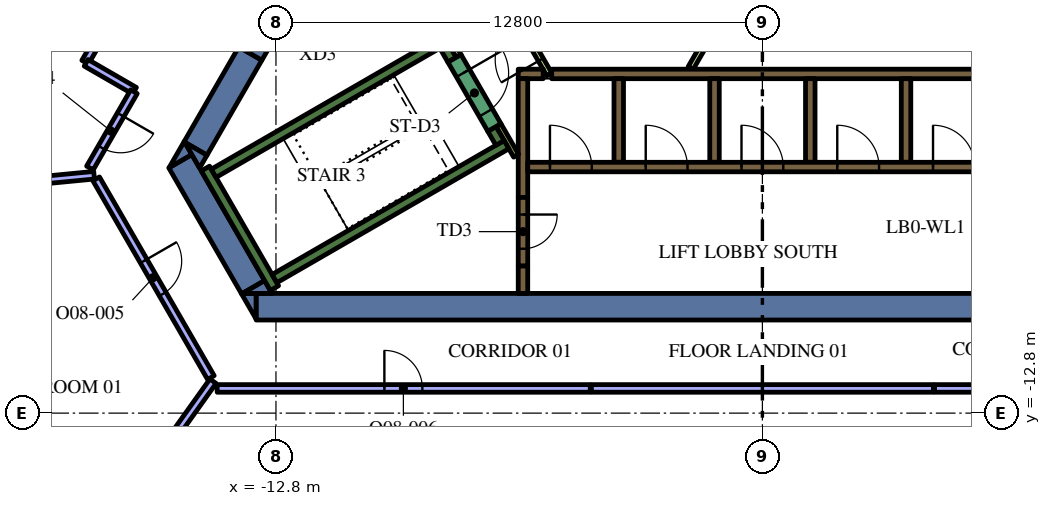
"""IFC4 building model, lengths in metres.
Left out: names, types, materials, properties, quantities, classifications, styles, units other than length and angle.
Written with IfcOpenShell. Run it as: python <this file> out.ifc"""

import sys

from ifc_helpers import new_model, si_unit, direction, frame, frame_2d, origin, place, context, subcontext, project, spatial, polyline, rectangle, outline, extrude, element, fill, save


model = new_model("IFC4")
c1 = context("Model", 3, precision=1e-05, world=origin(), true_north=direction((0.0, 1.0)))
c2 = subcontext(c1, "Body", "Model", "MODEL_VIEW")
j1 = project(units=[si_unit("LENGTHUNIT", "METRE"), si_unit("PLANEANGLEUNIT", "RADIAN")], contexts=[c1])
p1 = place(None, origin())
s1 = spatial("IfcSite", under=j1, at=p1, CompositionType="ELEMENT")
p2 = place(p1, origin())
s2 = spatial("IfcBuilding", under=s1, at=p2, CompositionType="ELEMENT")
p3 = place(p2, frame((0.0, 0.0, 231.0)))
s3 = spatial("IfcBuildingStorey", under=s2, at=p3, CompositionType="ELEMENT", Elevation=231.0)
p4 = place(p3, frame((8.904, -10.0, 0.0), z_axis=(0.0, 0.0, 1.0), x_axis=(-1.0, 0.0, 0.0)))
e1 = element("IfcWall", 1, at=p4, inside=s3, PredefinedType="SOLIDWALL", context=c2, shape_type="SweptSolid", body=[
    extrude(rectangle(XDim=22.226, YDim=0.7, at=frame_2d((11.113, 0.0))), origin(), (0.0, 0.0, 1.0), 4.2),
])
p5 = place(p3, origin())
e2 = element("IfcWall", 2, at=p5, inside=s3, PredefinedType="SOLIDWALL", context=c2, shape_type="SweptSolid", body=[
    extrude(outline(polyline([(-13.712, -9.65), (-13.324, -9.65), (-13.324, -10.322), (-13.712, -9.65)])), origin(), (0.0, 0.0, 1.0), 4.2),
])
p6 = place(p3, frame((-13.402, -9.487, 0.0), z_axis=(0.0, 0.0, 1.0), x_axis=(-0.500020498207, 0.866013568815, 0.0)))
e3 = element("IfcWall", 3, at=p6, inside=s3, PredefinedType="SOLIDWALL", context=c2, shape_type="SweptSolid", body=[
    extrude(rectangle(XDim=3.829, YDim=0.7, at=frame_2d((1.915, 0.0))), origin(), (0.0, 0.0, 1.0), 4.2),
])
e4 = element("IfcWall", 4, at=p5, inside=s3, PredefinedType="SOLIDWALL", context=c2, shape_type="SweptSolid", body=[
    extrude(outline(polyline([(-15.014, -5.995), (-15.611, -6.339), (-15.213, -5.65), (-15.014, -5.995)])), origin(), (0.0, 0.0, 1.0), 4.2),
])
e5 = element("IfcWall", 5, at=p5, inside=s3, PredefinedType="SOLIDWALL", context=c2, shape_type="SweptSolid", body=[
    extrude(outline(polyline([(-12.904, -9.65), (-13.68, -9.65), (-13.098, -9.314), (-12.904, -9.65)])), origin(), (0.0, 0.0, 1.0), 4.2),
])
p7 = place(p3, frame((-13.475, -3.339, 0.0), z_axis=(0.0, 0.0, 1.0), x_axis=(-0.499944726303, -0.866057313716, 0.0)))
e6 = element("IfcWall", 6, at=p7, inside=s3, PredefinedType="SOLIDWALL", context=c2, shape_type="SweptSolid", body=[
    extrude(rectangle(XDim=2.884, YDim=0.7, at=frame_2d((1.442, 0.0))), origin(), (0.0, 0.0, 1.0), 4.2),
])
e7 = element("IfcWall", 7, at=p5, inside=s3, PredefinedType="SOLIDWALL", context=c2, shape_type="SweptSolid", body=[
    extrude(outline(polyline([(-14.809, -6.35), (-15.197, -5.678), (-14.615, -6.014), (-14.809, -6.35)])), origin(), (0.0, 0.0, 1.0), 4.2),
])
p8 = place(p3, frame((-12.84, -9.511, 0.0), z_axis=(0.0, 0.0, 1.0), x_axis=(-0.499997733992, 0.866026712061, 0.0)))
e8 = element("IfcWall", 8, at=p8, inside=s3, PredefinedType="SOLIDWALL", context=c2, shape_type="SweptSolid", body=[
    extrude(rectangle(XDim=3.634, YDim=0.25, at=frame_2d((1.817, 0.0))), origin(), (0.0, 0.0, 1.0), 4.2),
])
p9 = place(p3, frame((-14.44, -6.49, 0.0), z_axis=(0.0, 0.0, 1.0), x_axis=(0.866022966069, 0.500004222222, 0.0)))
e9 = element("IfcWall", 9, at=p9, inside=s3, PredefinedType="SOLIDWALL", context=c2, shape_type="SweptSolid", body=[
    extrude(rectangle(XDim=6.8, YDim=0.25, at=frame_2d((3.4, 0.0))), origin(), (0.0, 0.0, 1.0), 4.2),
])
p10 = place(p3, frame((-8.168, -3.503, 0.0), z_axis=(0.0, 0.0, 1.0), x_axis=(-0.499952099219, 0.866053057547, 0.0)))
e10 = element("IfcWall", 10, at=p10, inside=s3, PredefinedType="SOLIDWALL", context=c2, shape_type="SweptSolid", body=[
    extrude(rectangle(XDim=0.675, YDim=0.25, at=frame_2d((0.337, 0.0))), origin(), (0.0, 0.0, 1.0), 4.2),
])
p11 = place(p3, frame((-12.84, -9.261, 0.0), z_axis=(0.0, 0.0, 1.0), x_axis=(0.866016039709, 0.500016218704, 0.0)))
e11 = element("IfcWall", 11, at=p11, inside=s3, PredefinedType="SOLIDWALL", context=c2, shape_type="SweptSolid", body=[
    extrude(rectangle(XDim=7.05, YDim=0.25, at=frame_2d((3.525, 0.0))), origin(), (0.0, 0.0, 1.0), 4.2),
])
p12 = place(p3, frame((-6.905, -5.69, 0.0), z_axis=(0.0, 0.0, 1.0), x_axis=(-0.500402024738, 0.865793170242, 0.0)))
e12 = element("IfcWall", 12, at=p12, inside=s3, PredefinedType="SOLIDWALL", context=c2, shape_type="SweptSolid", body=[
    extrude(rectangle(XDim=0.425, YDim=0.25, at=frame_2d((0.212, 0.0))), origin(), (0.0, 0.0, 1.0), 4.2),
])
p13 = place(p3, frame((-6.3, -8.925, 0.0), z_axis=(0.0, 0.0, 1.0), x_axis=(0.0, -1.0, 0.0)))
e13 = element("IfcWall", 13, at=p13, inside=s3, PredefinedType="SOLIDWALL", context=c2, shape_type="SweptSolid", body=[
    extrude(rectangle(XDim=0.725, YDim=0.25, at=frame_2d((0.363, 0.0))), origin(), (0.0, 0.0, 1.0), 4.2),
])
p14 = place(p3, frame((-5.545, -3.875, 0.0), z_axis=(0.0, 0.0, 1.0), x_axis=(1.0, 0.0, 0.0)))
e14 = element("IfcWall", 14, at=p14, inside=s3, PredefinedType="SOLIDWALL", context=c2, shape_type="SweptSolid", body=[
    extrude(rectangle(XDim=11.97, YDim=0.25, at=frame_2d((5.985, 0.0))), origin(), (0.0, 0.0, 1.0), 4.2),
])
p15 = place(p3, frame((-6.425, -3.875, 0.0), z_axis=(0.0, 0.0, 1.0), x_axis=(1.0, 0.0, 0.0)))
e15 = element("IfcWall", 15, at=p15, inside=s3, PredefinedType="SOLIDWALL", context=c2, shape_type="SweptSolid", body=[
    extrude(rectangle(XDim=0.658, YDim=0.25, at=frame_2d((0.329, 0.0))), origin(), (0.0, 0.0, 1.0), 4.2),
])
for number, where, z_axis, x_axis in (
    (16, (3.78, -4.0, 0.0), (0.0, 0.0, 1.0), (0.0, -1.0, 0.0)),
    (17, (1.26, -4.0, 0.0), (0.0, 0.0, 1.0), (0.0, -1.0, 0.0)),
    (18, (-1.26, -4.0, 0.0), (0.0, 0.0, 1.0), (0.0, -1.0, 0.0)),
    (19, (-3.78, -4.0, 0.0), (0.0, 0.0, 1.0), (0.0, -1.0, 0.0)),
):
    element("IfcWall", number, at=place(p3, frame(where, z_axis=z_axis, x_axis=x_axis)), inside=s3, PredefinedType="SOLIDWALL", context=c2, shape_type="SweptSolid", body=[
        extrude(rectangle(XDim=2.2, YDim=0.25, at=frame_2d((1.1, 0.0))), origin(), (0.0, 0.0, 1.0), 4.2),
    ])
p16 = place(p3, frame((-6.3, -7.125, 0.0), z_axis=(0.0, 0.0, 1.0), x_axis=(0.0, 1.0, 0.0)))
e20 = element("IfcWall", 20, at=p16, inside=s3, PredefinedType="SOLIDWALL", context=c2, shape_type="SweptSolid", body=[
    extrude(rectangle(XDim=3.125, YDim=0.25, at=frame_2d((1.562, 0.0))), origin(), (0.0, 0.0, 1.0), 4.2),
])
p17 = place(p3, frame((6.568, -3.627, 0.0), z_axis=(0.0, 0.0, 1.0), x_axis=(-0.499999455981, 0.866025717874, 0.0)))
e21 = element("IfcWall", 21, at=p17, inside=s3, PredefinedType="SOLIDWALL", context=c2, shape_type="SweptSolid", body=[
    extrude(rectangle(XDim=11.978, YDim=0.25, at=frame_2d((5.989, 0.0))), origin(), (0.0, 0.0, 1.0), 4.2),
])
p18 = place(p3, frame((-8.252, -2.958, 0.0), z_axis=(0.0, 0.0, 1.0), x_axis=(0.500174715838, -0.865924508047, 0.0)))
e22 = element("IfcWall", 22, at=p18, inside=s3, PredefinedType="PARTITIONING", context=c2, shape_type="SweptSolid", body=[
    extrude(rectangle(XDim=0.514, YDim=0.15, at=frame_2d((0.257, 0.0))), origin(), (0.0, 0.0, 1.0), 3.45),
])
p19 = place(p3, frame((-6.48, -6.027, 0.0), z_axis=(0.0, 0.0, 1.0), x_axis=(-0.499927229454, 0.866067413802, 0.0)))
e23 = element("IfcWall", 23, at=p19, inside=s3, PredefinedType="PARTITIONING", context=c2, shape_type="SweptSolid", body=[
    extrude(rectangle(XDim=0.929, YDim=0.15, at=frame_2d((0.464, 0.0))), origin(), (0.0, 0.0, 1.0), 4.2),
])
p20 = place(p3, frame((-1.887, -3.718, 0.0), z_axis=(0.0, 0.0, 1.0), x_axis=(0.500043732237, 0.866000153493, 0.0)))
e24 = element("IfcWall", 24, at=p20, inside=s3, PredefinedType="PARTITIONING", context=c2, shape_type="SweptSolid", body=[
    extrude(rectangle(XDim=3.114, YDim=0.15, at=frame_2d((1.557, 0.0))), origin(), (0.0, 0.0, 1.0), 3.45),
])
p21 = place(p3, frame((-6.175, -6.325, 0.0), z_axis=(0.0, 0.0, 1.0), x_axis=(1.0, 0.0, 0.0)))
e25 = element("IfcWall", 25, at=p21, inside=s3, PredefinedType="SOLIDWALL", context=c2, shape_type="SweptSolid", body=[
    extrude(rectangle(XDim=12.35, YDim=0.25, at=frame_2d((6.175, 0.0))), origin(), (0.0, 0.0, 1.0), 4.2),
])
p22 = place(p21, frame((0.585, 0.0, 0.0)))
e26 = element("IfcOpeningElement", 26, at=p22, cuts=e25, PredefinedType="OPENING", context=c2, shape_type="SweptSolid", body=[
    extrude(rectangle(XDim=1.1, YDim=2.1, at=frame_2d((0.55, 1.05))), frame((0.0, 0.135, 0.0), z_axis=(0.0, -1.0, 0.0), x_axis=(1.0, 0.0, 0.0)), (0.0, 0.0, 1.0), 0.27),
])
p23 = place(p21, frame((3.105, 0.0, 0.0)))
e27 = element("IfcOpeningElement", 27, at=p23, cuts=e25, PredefinedType="OPENING", context=c2, shape_type="SweptSolid", body=[
    extrude(rectangle(XDim=1.1, YDim=2.1, at=frame_2d((0.55, 1.05))), frame((0.0, 0.135, 0.0), z_axis=(0.0, -1.0, 0.0), x_axis=(1.0, 0.0, 0.0)), (0.0, 0.0, 1.0), 0.27),
])
p24 = place(p21, frame((5.625, 0.0, 0.0)))
e28 = element("IfcOpeningElement", 28, at=p24, cuts=e25, PredefinedType="OPENING", context=c2, shape_type="SweptSolid", body=[
    extrude(rectangle(XDim=1.1, YDim=2.1, at=frame_2d((0.55, 1.05))), frame((0.0, 0.135, 0.0), z_axis=(0.0, -1.0, 0.0), x_axis=(1.0, 0.0, 0.0)), (0.0, 0.0, 1.0), 0.27),
])
p25 = place(p21, frame((8.145, 0.0, 0.0)))
e29 = element("IfcOpeningElement", 29, at=p25, cuts=e25, PredefinedType="OPENING", context=c2, shape_type="SweptSolid", body=[
    extrude(rectangle(XDim=1.1, YDim=2.1, at=frame_2d((0.55, 1.05))), frame((0.0, 0.135, 0.0), z_axis=(0.0, -1.0, 0.0), x_axis=(1.0, 0.0, 0.0)), (0.0, 0.0, 1.0), 0.27),
])
p26 = place(p21, frame((10.665, 0.0, 0.0)))
e30 = element("IfcOpeningElement", 30, at=p26, cuts=e25, PredefinedType="OPENING", context=c2, shape_type="SweptSolid", body=[
    extrude(rectangle(XDim=1.1, YDim=2.1, at=frame_2d((0.55, 1.05))), frame((0.0, 0.135, 0.0), z_axis=(0.0, -1.0, 0.0), x_axis=(1.0, 0.0, 0.0)), (0.0, 0.0, 1.0), 0.27),
])
p27 = place(p3, frame((-8.103, -3.466, 0.0), z_axis=(0.0, 0.0, 1.0), x_axis=(0.500078061341, -0.865980330357, 0.0)))
e31 = element("IfcWall", 31, at=p27, inside=s3, PredefinedType="SOLIDWALL", context=c2, shape_type="SweptSolid", body=[
    extrude(rectangle(XDim=2.1, YDim=0.4, at=frame_2d((1.05, 0.0))), origin(), (0.0, 0.0, 1.0), 4.2),
])
p28 = place(p27, frame((0.45, 0.0, 0.0)))
e32 = element("IfcOpeningElement", 32, at=p28, cuts=e31, PredefinedType="OPENING", context=c2, shape_type="SweptSolid", body=[
    extrude(rectangle(XDim=1.2, YDim=2.1, at=frame_2d((0.6, 1.05))), frame((0.0, 0.21, 0.0), z_axis=(0.0, -1.0, 0.0), x_axis=(1.0, 0.0, 0.0)), (0.0, 0.0, 1.0), 0.42),
])
p29 = place(p3, frame((-6.3, -7.125, 0.0), z_axis=(0.0, 0.0, 1.0), x_axis=(0.0, -1.0, 0.0)))
e33 = element("IfcWall", 33, at=p29, inside=s3, PredefinedType="SOLIDWALL", context=c2, shape_type="SweptSolid", body=[
    extrude(rectangle(XDim=1.8, YDim=0.25, at=frame_2d((0.9, 0.0))), origin(), (0.0, 0.0, 1.0), 4.2),
])
p30 = place(p29, frame((0.45, 0.0, 0.0)))
e34 = element("IfcOpeningElement", 34, at=p30, cuts=e33, PredefinedType="OPENING", context=c2, shape_type="SweptSolid", body=[
    extrude(rectangle(XDim=0.9, YDim=2.1, at=frame_2d((0.45, 1.05))), frame((0.0, 0.135, 0.0), z_axis=(0.0, -1.0, 0.0), x_axis=(1.0, 0.0, 0.0)), (0.0, 0.0, 1.0), 0.27),
])
p31 = place(p3, frame((-5.606, -3.89, 0.0), z_axis=(0.0, 0.0, 1.0), x_axis=(-0.500027713859, 0.866009402589, 0.0)))
e35 = element("IfcWall", 35, at=p31, inside=s3, PredefinedType="PARTITIONING", context=c2, shape_type="SweptSolid", body=[
    extrude(rectangle(XDim=2.1, YDim=0.15, at=frame_2d((1.05, 0.0))), origin(), (0.0, 0.0, 1.0), 3.45),
])
p32 = place(p31, frame((0.45, 0.0, 0.0)))
e36 = element("IfcOpeningElement", 36, at=p32, cuts=e35, PredefinedType="OPENING", context=c2, shape_type="SweptSolid", body=[
    extrude(rectangle(XDim=1.2, YDim=2.1, at=frame_2d((0.6, 1.05))), frame((0.0, 0.085, 0.0), z_axis=(0.0, -1.0, 0.0), x_axis=(1.0, 0.0, 0.0)), (0.0, 0.0, 1.0), 0.17),
])
p33 = place(p3, frame((-13.475, -3.339, 0.0), z_axis=(0.0, 0.0, 1.0), x_axis=(0.499954529098, 0.86605165483, 0.0)))
e37 = element("IfcWall", 37, at=p33, inside=s3, PredefinedType="SOLIDWALL", context=c2, shape_type="SweptSolid", body=[
    extrude(rectangle(XDim=1.7, YDim=0.7, at=frame_2d((0.85, 0.0))), origin(), (0.0, 0.0, 1.0), 4.2),
])
p34 = place(p33, frame((0.25, 0.0, 0.0)))
e38 = element("IfcOpeningElement", 38, at=p34, cuts=e37, PredefinedType="OPENING", context=c2, shape_type="SweptSolid", body=[
    extrude(rectangle(XDim=1.2, YDim=2.1, at=frame_2d((0.6, 1.05))), frame((0.0, 0.36, 0.0), z_axis=(0.0, -1.0, 0.0), x_axis=(1.0, 0.0, 0.0)), (0.0, 0.0, 1.0), 0.72),
])
p35 = place(p3, frame((-17.586, -6.54, 0.0), z_axis=(0.0, 0.0, 1.0), x_axis=(-0.995357542522, -0.096246363795, 0.0)))
e39 = element("IfcWall", 39, at=p35, inside=s3, PredefinedType="PARTITIONING", context=c2, shape_type="SweptSolid", body=[
    extrude(rectangle(XDim=7.318, YDim=0.2, at=frame_2d((3.659, 0.0))), origin(), (0.0, 0.0, 1.0), 3.45),
])
p36 = place(p3, frame((-16.681, -1.593, 0.0), z_axis=(0.0, 0.0, 1.0), x_axis=(-0.499985038317, -0.866034041744, 0.0)))
e40 = element("IfcWall", 40, at=p36, inside=s3, PredefinedType="PARTITIONING", context=c2, shape_type="SweptSolid", body=[
    extrude(rectangle(XDim=2.28, YDim=0.2, at=frame_2d((1.14, 0.0))), origin(), (0.0, 0.0, 1.0), 3.45),
])
p37 = place(p3, frame((-17.795, -3.582, 0.0), z_axis=(0.0, 0.0, 1.0), x_axis=(0.866016893711, -0.50001473959, 0.0)))
e41 = element("IfcWall", 41, at=p37, inside=s3, PredefinedType="PARTITIONING", context=c2, shape_type="SweptSolid", body=[
    extrude(rectangle(XDim=1.47, YDim=0.2, at=frame_2d((0.735, 0.0))), origin(), (0.0, 0.0, 1.0), 3.45),
])
p38 = place(p3, frame((-16.537, -4.343, 0.0), z_axis=(0.0, 0.0, 1.0), x_axis=(-0.500014285048, -0.866017156151, 0.0)))
e42 = element("IfcWall", 42, at=p38, inside=s3, PredefinedType="PARTITIONING", context=c2, shape_type="SweptSolid", body=[
    extrude(rectangle(XDim=2.317, YDim=0.2, at=frame_2d((1.159, 0.0))), origin(), (0.0, 0.0, 1.0), 3.45),
])
p39 = place(p38, frame((0.7, 0.0, 0.0)))
e43 = element("IfcOpeningElement", 43, at=p39, cuts=e42, PredefinedType="OPENING", context=c2, shape_type="SweptSolid", body=[
    extrude(rectangle(XDim=1.0, YDim=2.1, at=frame_2d((0.5, 1.05))), frame((0.0, 0.11, 0.0), z_axis=(0.0, -1.0, 0.0), x_axis=(1.0, 0.0, 0.0)), (0.0, 0.0, 1.0), 0.22),
])
p40 = place(p3, frame((-14.457, -11.96, 0.0), z_axis=(0.0, 0.0, 1.0), x_axis=(-0.581023578026, -0.813886725397, 0.0)))
e44 = element("IfcWall", 44, at=p40, inside=s3, PredefinedType="PARTITIONING", context=c2, shape_type="SweptSolid", body=[
    extrude(rectangle(XDim=7.318, YDim=0.2, at=frame_2d((3.659, 0.0))), origin(), (0.0, 0.0, 1.0), 3.45),
])
p41 = place(p3, frame((-17.531, -6.635, 0.0), z_axis=(0.0, 0.0, 1.0), x_axis=(0.500009459589, -0.866019942219, 0.0)))
e45 = element("IfcWall", 45, at=p41, inside=s3, PredefinedType="PARTITIONING", context=c2, shape_type="SweptSolid", body=[
    extrude(rectangle(XDim=6.038, YDim=0.2, at=frame_2d((3.019, 0.0))), origin(), (0.0, 0.0, 1.0), 3.45),
])
p42 = place(p41, frame((2.5, 0.0, 0.0)))
e46 = element("IfcOpeningElement", 46, at=p42, cuts=e45, PredefinedType="OPENING", context=c2, shape_type="SweptSolid", body=[
    extrude(rectangle(XDim=1.0, YDim=2.1, at=frame_2d((0.5, 1.05))), frame((0.0, 0.11, 0.0), z_axis=(0.0, -1.0, 0.0), x_axis=(1.0, 0.0, 0.0)), (0.0, 0.0, 1.0), 0.22),
])
p43 = place(p3, frame((-4.5, -12.15, 0.0), z_axis=(0.0, 0.0, 1.0), x_axis=(1.0, 0.0, 0.0)))
e47 = element("IfcWall", 47, at=p43, inside=s3, PredefinedType="PARTITIONING", context=c2, shape_type="SweptSolid", body=[
    extrude(rectangle(XDim=9.0, YDim=0.2, at=frame_2d((4.5, 0.0))), origin(), (0.0, 0.0, 1.0), 3.45),
])
p44 = place(p3, frame((-14.347, -12.15, 0.0), z_axis=(0.0, 0.0, 1.0), x_axis=(1.0, 0.0, 0.0)))
e48 = element("IfcWall", 48, at=p44, inside=s3, PredefinedType="PARTITIONING", context=c2, shape_type="SweptSolid", body=[
    extrude(rectangle(XDim=9.817, YDim=0.2, at=frame_2d((4.909, 0.0))), origin(), (0.0, 0.0, 1.0), 3.45),
])
p45 = place(p44, frame((4.4, 0.0, 0.0)))
e49 = element("IfcOpeningElement", 49, at=p45, cuts=e48, PredefinedType="OPENING", context=c2, shape_type="SweptSolid", body=[
    extrude(rectangle(XDim=1.0, YDim=2.1, at=frame_2d((0.5, 1.05))), frame((0.0, 0.11, 0.0), z_axis=(0.0, -1.0, 0.0), x_axis=(1.0, 0.0, 0.0)), (0.0, 0.0, 1.0), 0.22),
])
p46 = place(p3, frame((4.53, -12.15, 0.0), z_axis=(0.0, 0.0, 1.0), x_axis=(1.0, 0.0, 0.0)))
e50 = element("IfcWall", 50, at=p46, inside=s3, PredefinedType="PARTITIONING", context=c2, shape_type="SweptSolid", body=[
    extrude(rectangle(XDim=1.787, YDim=0.2, at=frame_2d((0.894, 0.0))), origin(), (0.0, 0.0, 1.0), 3.45),
])
p47 = place(p22, origin())
e51 = element("IfcDoor", 51, at=p47, inside=s3, OperationType="DOUBLE_DOOR_SLIDING", PredefinedType="DOOR", context=c2, shape_type="SweptSolid", body=[
    extrude(rectangle(XDim=1.1, YDim=2.1, at=frame_2d((0.55, 1.05))), frame((0.0, 0.025, 0.0), z_axis=(0.0, -1.0, 0.0), x_axis=(1.0, 0.0, 0.0)), (0.0, 0.0, 1.0), 0.05),
])
fill(e26, e51)
p48 = place(p23, origin())
e52 = element("IfcDoor", 52, at=p48, inside=s3, OperationType="DOUBLE_DOOR_SLIDING", PredefinedType="DOOR", context=c2, shape_type="SweptSolid", body=[
    extrude(rectangle(XDim=1.1, YDim=2.1, at=frame_2d((0.55, 1.05))), frame((0.0, 0.025, 0.0), z_axis=(0.0, -1.0, 0.0), x_axis=(1.0, 0.0, 0.0)), (0.0, 0.0, 1.0), 0.05),
])
fill(e27, e52)
p49 = place(p24, origin())
e53 = element("IfcDoor", 53, at=p49, inside=s3, OperationType="DOUBLE_DOOR_SLIDING", PredefinedType="DOOR", context=c2, shape_type="SweptSolid", body=[
    extrude(rectangle(XDim=1.1, YDim=2.1, at=frame_2d((0.55, 1.05))), frame((0.0, 0.025, 0.0), z_axis=(0.0, -1.0, 0.0), x_axis=(1.0, 0.0, 0.0)), (0.0, 0.0, 1.0), 0.05),
])
fill(e28, e53)
p50 = place(p25, origin())
e54 = element("IfcDoor", 54, at=p50, inside=s3, OperationType="DOUBLE_DOOR_SLIDING", PredefinedType="DOOR", context=c2, shape_type="SweptSolid", body=[
    extrude(rectangle(XDim=1.1, YDim=2.1, at=frame_2d((0.55, 1.05))), frame((0.0, 0.025, 0.0), z_axis=(0.0, -1.0, 0.0), x_axis=(1.0, 0.0, 0.0)), (0.0, 0.0, 1.0), 0.05),
])
fill(e29, e54)
p51 = place(p26, origin())
e55 = element("IfcDoor", 55, at=p51, inside=s3, OperationType="DOUBLE_DOOR_SLIDING", PredefinedType="DOOR", context=c2, shape_type="SweptSolid", body=[
    extrude(rectangle(XDim=1.1, YDim=2.1, at=frame_2d((0.55, 1.05))), frame((0.0, 0.025, 0.0), z_axis=(0.0, -1.0, 0.0), x_axis=(1.0, 0.0, 0.0)), (0.0, 0.0, 1.0), 0.05),
])
fill(e30, e55)
p52 = place(p28, origin())
e56 = element("IfcDoor", 56, at=p52, inside=s3, OperationType="SINGLE_SWING_LEFT", PredefinedType="DOOR", context=c2, shape_type="SweptSolid", body=[
    extrude(rectangle(XDim=1.2, YDim=2.1, at=frame_2d((0.6, 1.05))), frame((0.0, 0.025, 0.0), z_axis=(0.0, -1.0, 0.0), x_axis=(1.0, 0.0, 0.0)), (0.0, 0.0, 1.0), 0.05),
])
fill(e32, e56)
p53 = place(p30, origin())
e57 = element("IfcDoor", 57, at=p53, inside=s3, OperationType="SINGLE_SWING_LEFT", PredefinedType="DOOR", context=c2, shape_type="SweptSolid", body=[
    extrude(rectangle(XDim=0.9, YDim=2.1, at=frame_2d((0.45, 1.05))), frame((0.0, 0.025, 0.0), z_axis=(0.0, -1.0, 0.0), x_axis=(1.0, 0.0, 0.0)), (0.0, 0.0, 1.0), 0.05),
])
fill(e34, e57)
p54 = place(p32, origin())
e58 = element("IfcDoor", 58, at=p54, inside=s3, OperationType="SINGLE_SWING_LEFT", PredefinedType="DOOR", context=c2, shape_type="SweptSolid", body=[
    extrude(rectangle(XDim=1.2, YDim=2.1, at=frame_2d((0.6, 1.05))), frame((0.0, 0.025, 0.0), z_axis=(0.0, -1.0, 0.0), x_axis=(1.0, 0.0, 0.0)), (0.0, 0.0, 1.0), 0.05),
])
fill(e36, e58)
p55 = place(p39, origin())
e59 = element("IfcDoor", 59, at=p55, inside=s3, OperationType="SINGLE_SWING_RIGHT", PredefinedType="DOOR", context=c2, shape_type="SweptSolid", body=[
    extrude(rectangle(XDim=1.0, YDim=2.1, at=frame_2d((0.5, 1.05))), frame((0.0, 0.025, 0.0), z_axis=(0.0, -1.0, 0.0), x_axis=(1.0, 0.0, 0.0)), (0.0, 0.0, 1.0), 0.05),
])
fill(e43, e59)
p56 = place(p42, origin())
e60 = element("IfcDoor", 60, at=p56, inside=s3, OperationType="SINGLE_SWING_LEFT", PredefinedType="DOOR", context=c2, shape_type="SweptSolid", body=[
    extrude(rectangle(XDim=1.0, YDim=2.1, at=frame_2d((0.5, 1.05))), frame((0.0, 0.025, 0.0), z_axis=(0.0, -1.0, 0.0), x_axis=(1.0, 0.0, 0.0)), (0.0, 0.0, 1.0), 0.05),
])
fill(e46, e60)
p57 = place(p45, origin())
e61 = element("IfcDoor", 61, at=p57, inside=s3, OperationType="SINGLE_SWING_LEFT", PredefinedType="DOOR", context=c2, shape_type="SweptSolid", body=[
    extrude(rectangle(XDim=1.0, YDim=2.1, at=frame_2d((0.5, 1.05))), frame((0.0, 0.025, 0.0), z_axis=(0.0, -1.0, 0.0), x_axis=(1.0, 0.0, 0.0)), (0.0, 0.0, 1.0), 0.05),
])
fill(e49, e61)
save(model, sys.argv[1])
